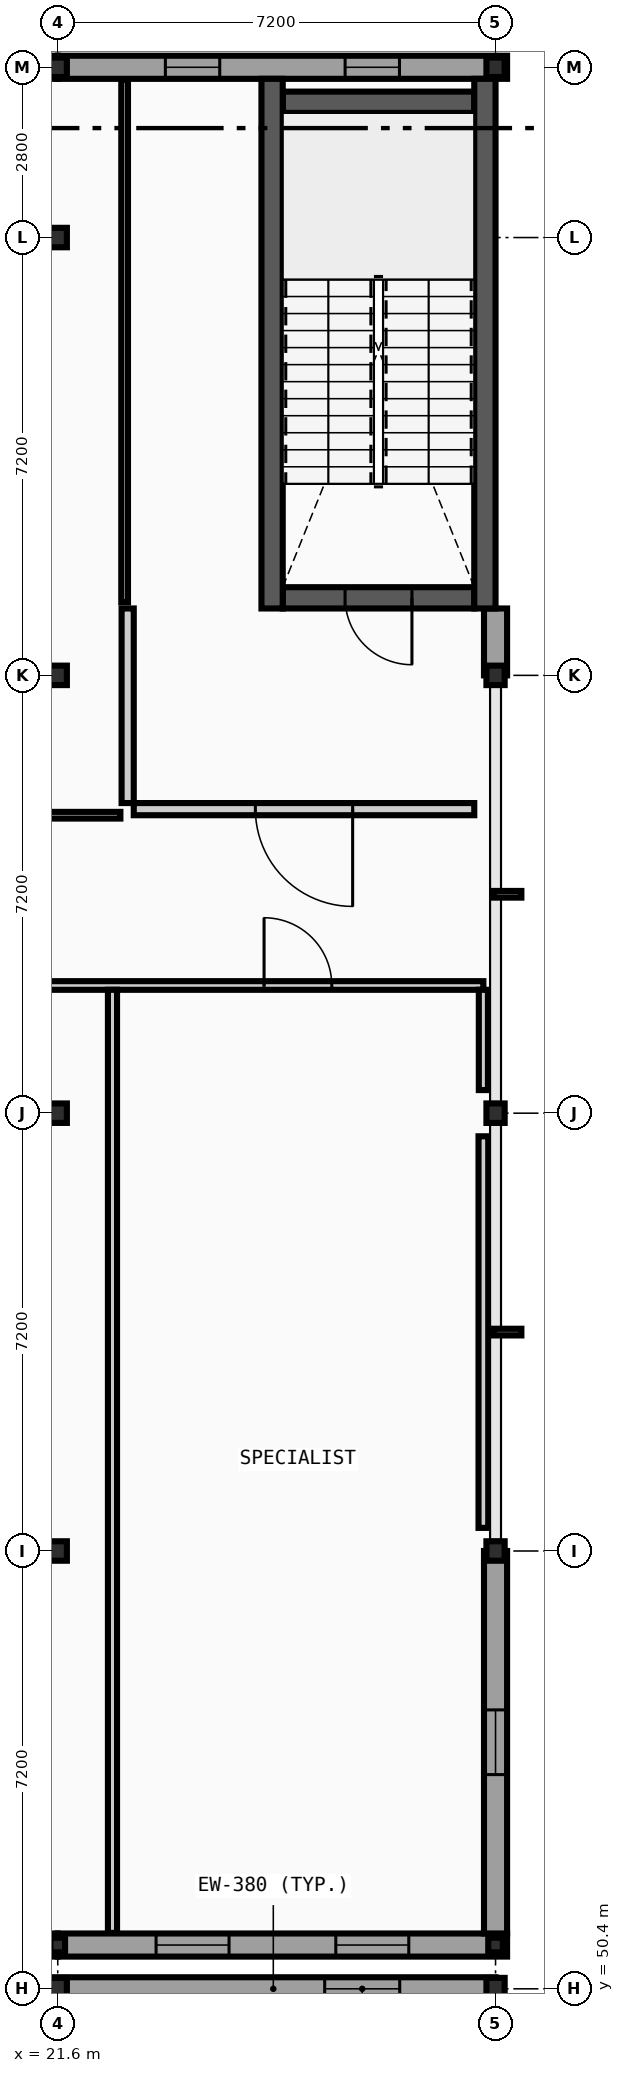
"""IFC4 building model, lengths in metres.
Left out: names, types, materials, properties, quantities, classifications, styles, units other than length and angle.
Written with IfcOpenShell. Run it as: python <this file> out.ifc"""

import sys

from ifc_helpers import new_model, si_unit, direction, frame, frame_2d, origin, origin_2d, place, context, subcontext, project, spatial, rectangle, i_section, extrude, element, fill, save


model = new_model("IFC4")
c1 = context("Model", 3, precision=1e-05, world=origin(), true_north=direction((0.0, 1.0)))
c2 = subcontext(c1, "Body", "Model", "MODEL_VIEW")
j1 = project(units=[si_unit("LENGTHUNIT", "METRE"), si_unit("PLANEANGLEUNIT", "RADIAN")], contexts=[c1])
p1 = place(None, origin())
s1 = spatial("IfcSite", under=j1, at=p1, CompositionType="ELEMENT")
p2 = place(p1, origin())
s2 = spatial("IfcBuilding", under=s1, at=p2, CompositionType="ELEMENT")
p3 = place(p2, frame((0.0, 0.0, 9.6)))
s3 = spatial("IfcBuildingStorey", under=s2, at=p3, CompositionType="ELEMENT", Elevation=9.6)
p4 = place(p3, frame((21.6, 50.4, 0.0), z_axis=(0.0, 0.0, 1.0), x_axis=(1.0, 0.0, 0.0)))
e1 = element("IfcColumn", 1, at=p4, inside=s3, PredefinedType="COLUMN", context=c2, shape_type="SweptSolid", body=[
    extrude(i_section(OverallWidth=0.3, OverallDepth=0.36, WebThickness=0.012, FlangeThickness=0.022, FilletRadius=0.027, at=origin_2d()), origin(), (0.0, 0.0, 1.0), 4.4),
])
p5 = place(p3, frame((21.6, 51.12, 0.0), z_axis=(0.0, 0.0, 1.0), x_axis=(1.0, 0.0, 0.0)))
e2 = element("IfcColumn", 2, at=p5, inside=s3, PredefinedType="COLUMN", context=c2, shape_type="SweptSolid", body=[
    extrude(i_section(OverallWidth=0.24, OverallDepth=0.24, WebThickness=0.01, FlangeThickness=0.017, FilletRadius=0.021, at=origin_2d()), origin(), (0.0, 0.0, 1.0), 4.4),
])
for number, where, z_axis, x_axis in (
    (3, (21.6, 57.6, 0.0), (0.0, 0.0, 1.0), (1.0, 0.0, 0.0)),
    (4, (21.6, 64.8, 0.0), (0.0, 0.0, 1.0), (1.0, 0.0, 0.0)),
    (5, (21.6, 72.0, 0.0), (0.0, 0.0, 1.0), (1.0, 0.0, 0.0)),
    (6, (21.6, 79.2, 0.0), (0.0, 0.0, 1.0), (1.0, 0.0, 0.0)),
    (7, (21.6, 82.0, 0.0), (0.0, 0.0, 1.0), (1.0, 0.0, 0.0)),
):
    element("IfcColumn", number, at=place(p3, frame(where, z_axis=z_axis, x_axis=x_axis)), inside=s3, PredefinedType="COLUMN", context=c2, shape_type="SweptSolid", body=[
        extrude(i_section(OverallWidth=0.3, OverallDepth=0.32, WebThickness=0.011, FlangeThickness=0.021, FilletRadius=0.027, at=origin_2d()), origin(), (0.0, 0.0, 1.0), 4.4),
    ])
p6 = place(p3, frame((28.8, 50.4, 0.0), z_axis=(0.0, 0.0, 1.0), x_axis=(1.0, 0.0, 0.0)))
e8 = element("IfcColumn", 8, at=p6, inside=s3, PredefinedType="COLUMN", context=c2, shape_type="SweptSolid", body=[
    extrude(i_section(OverallWidth=0.3, OverallDepth=0.36, WebThickness=0.012, FlangeThickness=0.022, FilletRadius=0.027, at=origin_2d()), origin(), (0.0, 0.0, 1.0), 4.4),
])
p7 = place(p3, frame((28.8, 51.12, 0.0), z_axis=(0.0, 0.0, 1.0), x_axis=(1.0, 0.0, 0.0)))
e9 = element("IfcColumn", 9, at=p7, inside=s3, PredefinedType="COLUMN", context=c2, shape_type="SweptSolid", body=[
    extrude(i_section(OverallWidth=0.24, OverallDepth=0.24, WebThickness=0.01, FlangeThickness=0.017, FilletRadius=0.021, at=origin_2d()), origin(), (0.0, 0.0, 1.0), 4.4),
])
for number, where, z_axis, x_axis in (
    (10, (28.8, 57.6, 0.0), (0.0, 0.0, 1.0), (1.0, 0.0, 0.0)),
    (11, (28.8, 64.8, 0.0), (0.0, 0.0, 1.0), (1.0, 0.0, 0.0)),
    (12, (28.8, 72.0, 0.0), (0.0, 0.0, 1.0), (1.0, 0.0, 0.0)),
    (13, (28.8, 82.0, 0.0), (0.0, 0.0, 1.0), (1.0, 0.0, 0.0)),
):
    element("IfcColumn", number, at=place(p3, frame(where, z_axis=z_axis, x_axis=x_axis)), inside=s3, PredefinedType="COLUMN", context=c2, shape_type="SweptSolid", body=[
        extrude(i_section(OverallWidth=0.3, OverallDepth=0.32, WebThickness=0.011, FlangeThickness=0.021, FilletRadius=0.027, at=origin_2d()), origin(), (0.0, 0.0, 1.0), 4.4),
    ])
p8 = place(p3, frame((28.8, 50.4, 0.0), z_axis=(0.0, 0.0, 1.0), x_axis=(-1.0, 0.0, 0.0)))
e14 = element("IfcWall", 14, at=p8, inside=s3, PredefinedType="STANDARD", context=c2, shape_type="SweptSolid", body=[
    extrude(rectangle(XDim=7.31, YDim=0.38, at=frame_2d((3.655, 0.0))), origin(), (0.0, 0.0, 1.0), 3.895),
])
p9 = place(p8, frame((1.576, 0.0, 0.95)))
e15 = element("IfcOpeningElement", 15, at=p9, cuts=e14, PredefinedType="OPENING", context=c2, shape_type="SweptSolid", body=[
    extrude(rectangle(XDim=1.234, YDim=1.296, at=frame_2d((0.617, 0.648))), frame((0.0, 0.2, 0.0), z_axis=(0.0, -1.0, 0.0), x_axis=(1.0, 0.0, 0.0)), (0.0, 0.0, 1.0), 0.4),
])
p10 = place(p3, frame((14.4, 51.12, 0.0), z_axis=(0.0, 0.0, 1.0), x_axis=(1.0, 0.0, 0.0)))
e16 = element("IfcWall", 16, at=p10, inside=s3, PredefinedType="STANDARD", context=c2, shape_type="SweptSolid", body=[
    extrude(rectangle(XDim=7.2, YDim=0.38, at=frame_2d((3.6, 0.0))), origin(), (0.0, 0.0, 1.0), 3.875),
])
p11 = place(p10, frame((1.577, 0.0, 0.95)))
e17 = element("IfcOpeningElement", 17, at=p11, cuts=e16, PredefinedType="OPENING", context=c2, shape_type="SweptSolid", body=[
    extrude(rectangle(XDim=1.166, YDim=1.26, at=frame_2d((0.583, 0.63))), frame((0.0, 0.2, 0.0), z_axis=(0.0, -1.0, 0.0), x_axis=(1.0, 0.0, 0.0)), (0.0, 0.0, 1.0), 0.4),
])
p12 = place(p3, frame((21.6, 51.12, 0.0), z_axis=(0.0, 0.0, 1.0), x_axis=(1.0, 0.0, 0.0)))
e18 = element("IfcWall", 18, at=p12, inside=s3, PredefinedType="STANDARD", context=c2, shape_type="SweptSolid", body=[
    extrude(rectangle(XDim=7.39, YDim=0.38, at=frame_2d((3.695, 0.0))), origin(), (0.0, 0.0, 1.0), 3.875),
])
p13 = place(p12, frame((1.617, 0.0, 0.95)))
e19 = element("IfcOpeningElement", 19, at=p13, cuts=e18, PredefinedType="OPENING", context=c2, shape_type="SweptSolid", body=[
    extrude(rectangle(XDim=1.2, YDim=1.26, at=frame_2d((0.6, 0.63))), frame((0.0, 0.2, 0.0), z_axis=(0.0, -1.0, 0.0), x_axis=(1.0, 0.0, 0.0)), (0.0, 0.0, 1.0), 0.4),
])
p14 = place(p12, frame((4.573, 0.0, 0.95)))
e20 = element("IfcOpeningElement", 20, at=p14, cuts=e18, PredefinedType="OPENING", context=c2, shape_type="SweptSolid", body=[
    extrude(rectangle(XDim=1.2, YDim=1.26, at=frame_2d((0.6, 0.63))), frame((0.0, 0.2, 0.0), z_axis=(0.0, -1.0, 0.0), x_axis=(1.0, 0.0, 0.0)), (0.0, 0.0, 1.0), 0.4),
])
p15 = place(p3, frame((21.6, 82.0, 0.0), z_axis=(0.0, 0.0, 1.0), x_axis=(-1.0, 0.0, 0.0)))
e21 = element("IfcWall", 21, at=p15, inside=s3, PredefinedType="STANDARD", context=c2, shape_type="SweptSolid", body=[
    extrude(rectangle(XDim=7.2, YDim=0.38, at=frame_2d((3.6, 0.0))), origin(), (0.0, 0.0, 1.0), 3.895),
])
p16 = place(p15, frame((4.61, 0.0, 0.95)))
e22 = element("IfcOpeningElement", 22, at=p16, cuts=e21, PredefinedType="OPENING", context=c2, shape_type="SweptSolid", body=[
    extrude(rectangle(XDim=0.86, YDim=1.296, at=frame_2d((0.43, 0.648))), frame((0.0, 0.2, 0.0), z_axis=(0.0, -1.0, 0.0), x_axis=(1.0, 0.0, 0.0)), (0.0, 0.0, 1.0), 0.4),
])
p17 = place(p3, frame((28.99, 82.0, 0.0), z_axis=(0.0, 0.0, 1.0), x_axis=(-1.0, 0.0, 0.0)))
e23 = element("IfcWall", 23, at=p17, inside=s3, PredefinedType="STANDARD", context=c2, shape_type="SweptSolid", body=[
    extrude(rectangle(XDim=7.39, YDim=0.38, at=frame_2d((3.695, 0.0))), origin(), (0.0, 0.0, 1.0), 3.895),
])
p18 = place(p17, frame((1.77, 0.0, 0.95)))
e24 = element("IfcOpeningElement", 24, at=p18, cuts=e23, PredefinedType="OPENING", context=c2, shape_type="SweptSolid", body=[
    extrude(rectangle(XDim=0.894, YDim=1.296, at=frame_2d((0.447, 0.648))), frame((0.0, 0.2, 0.0), z_axis=(0.0, -1.0, 0.0), x_axis=(1.0, 0.0, 0.0)), (0.0, 0.0, 1.0), 0.4),
])
p19 = place(p17, frame((4.726, 0.0, 0.95)))
e25 = element("IfcOpeningElement", 25, at=p19, cuts=e23, PredefinedType="OPENING", context=c2, shape_type="SweptSolid", body=[
    extrude(rectangle(XDim=0.894, YDim=1.296, at=frame_2d((0.447, 0.648))), frame((0.0, 0.2, 0.0), z_axis=(0.0, -1.0, 0.0), x_axis=(1.0, 0.0, 0.0)), (0.0, 0.0, 1.0), 0.4),
])
p20 = place(p3, frame((28.8, 51.31, 0.0), z_axis=(0.0, 0.0, 1.0), x_axis=(0.0, 1.0, 0.0)))
e26 = element("IfcWall", 26, at=p20, inside=s3, PredefinedType="STANDARD", context=c2, shape_type="SweptSolid", body=[
    extrude(rectangle(XDim=6.29, YDim=0.38, at=frame_2d((3.145, 0.0))), origin(), (0.0, 0.0, 1.0), 3.865),
])
p21 = place(p20, frame((2.613, 0.0, 0.95)))
e27 = element("IfcOpeningElement", 27, at=p21, cuts=e26, PredefinedType="OPENING", context=c2, shape_type="SweptSolid", body=[
    extrude(rectangle(XDim=1.064, YDim=1.296, at=frame_2d((0.532, 0.648))), frame((0.0, 0.2, 0.0), z_axis=(0.0, -1.0, 0.0), x_axis=(1.0, 0.0, 0.0)), (0.0, 0.0, 1.0), 0.4),
])
p22 = place(p3, frame((28.8, 72.0, 0.0), z_axis=(0.0, 0.0, 1.0), x_axis=(0.0, 1.0, 0.0)))
e28 = element("IfcWall", 28, at=p22, inside=s3, PredefinedType="STANDARD", context=c2, shape_type="SweptSolid", body=[
    extrude(rectangle(XDim=1.1, YDim=0.38, at=frame_2d((0.55, 0.0))), origin(), (0.0, 0.0, 1.0), 4.2),
])
p23 = place(p3, frame((25.3, 73.275, 0.0), z_axis=(0.0, 0.0, 1.0), x_axis=(1.0, 0.0, 0.0)))
e29 = element("IfcWall", 29, at=p23, inside=s3, PredefinedType="SHEAR", context=c2, shape_type="SweptSolid", body=[
    extrude(rectangle(XDim=3.15, YDim=0.35, at=frame_2d((1.575, 0.0))), origin(), (0.0, 0.0, 1.0), 4.2),
])
p24 = place(p23, frame((1.025, 0.0, 0.0)))
e30 = element("IfcOpeningElement", 30, at=p24, cuts=e29, PredefinedType="OPENING", context=c2, shape_type="SweptSolid", body=[
    extrude(rectangle(XDim=1.1, YDim=2.15, at=frame_2d((0.55, 1.075))), frame((0.0, 0.185, 0.0), z_axis=(0.0, -1.0, 0.0), x_axis=(1.0, 0.0, 0.0)), (0.0, 0.0, 1.0), 0.37),
])
p25 = place(p3, frame((25.3, 81.425, 0.0), z_axis=(0.0, 0.0, 1.0), x_axis=(1.0, 0.0, 0.0)))
e31 = element("IfcWall", 31, at=p25, inside=s3, PredefinedType="SHEAR", context=c2, shape_type="SweptSolid", body=[
    extrude(rectangle(XDim=3.15, YDim=0.35, at=frame_2d((1.575, 0.0))), origin(), (0.0, 0.0, 1.0), 4.2),
])
for number, where, z_axis, x_axis in (
    (32, (25.125, 73.1, 0.0), (0.0, 0.0, 1.0), (0.0, 1.0, 0.0)),
    (33, (28.625, 73.1, 0.0), (0.0, 0.0, 1.0), (0.0, 1.0, 0.0)),
):
    element("IfcWall", number, at=place(p3, frame(where, z_axis=z_axis, x_axis=x_axis)), inside=s3, PredefinedType="SHEAR", context=c2, shape_type="SweptSolid", body=[
        extrude(rectangle(XDim=8.71, YDim=0.35, at=frame_2d((4.355, 0.0))), origin(), (0.0, 0.0, 1.0), 4.2),
    ])
p26 = place(p3, frame((22.85, 69.8, 0.0), z_axis=(0.0, 0.0, 1.0), x_axis=(1.0, 0.0, 0.0)))
e34 = element("IfcWall", 34, at=p26, inside=s3, PredefinedType="PARTITIONING", context=c2, shape_type="SweptSolid", body=[
    extrude(rectangle(XDim=5.6, YDim=0.2, at=frame_2d((2.8, 0.0))), origin(), (0.0, 0.0, 1.0), 4.2),
])
p27 = place(p26, frame((2.0, 0.0, 0.0)))
e35 = element("IfcOpeningElement", 35, at=p27, cuts=e34, PredefinedType="OPENING", context=c2, shape_type="SweptSolid", body=[
    extrude(rectangle(XDim=1.6, YDim=2.2, at=frame_2d((0.8, 1.1))), frame((0.0, 0.11, 0.0), z_axis=(0.0, -1.0, 0.0), x_axis=(1.0, 0.0, 0.0)), (0.0, 0.0, 1.0), 0.22),
])
p28 = place(p3, frame((22.75, 69.9, 0.0), z_axis=(0.0, 0.0, 1.0), x_axis=(0.0, 1.0, 0.0)))
e36 = element("IfcWall", 36, at=p28, inside=s3, PredefinedType="PARTITIONING", context=c2, shape_type="SweptSolid", body=[
    extrude(rectangle(XDim=3.2, YDim=0.2, at=frame_2d((1.6, 0.0))), origin(), (0.0, 0.0, 1.0), 4.2),
])
p29 = place(p3, frame((14.7, 66.9, 0.0), z_axis=(0.0, 0.0, 1.0), x_axis=(1.0, 0.0, 0.0)))
e37 = element("IfcWall", 37, at=p29, inside=s3, PredefinedType="PARTITIONING", context=c2, shape_type="SweptSolid", body=[
    extrude(rectangle(XDim=13.9, YDim=0.142, at=frame_2d((6.95, 0.0))), origin(), (0.0, 0.0, 1.0), 4.2),
])
p30 = place(p29, frame((10.293, 0.0, 0.0)))
e38 = element("IfcOpeningElement", 38, at=p30, cuts=e37, PredefinedType="OPENING", context=c2, shape_type="SweptSolid", body=[
    extrude(rectangle(XDim=1.114, YDim=2.152, at=frame_2d((0.557, 1.076))), frame((0.0, 0.081, 0.0), z_axis=(0.0, -1.0, 0.0), x_axis=(1.0, 0.0, 0.0)), (0.0, 0.0, 1.0), 0.162),
])
p31 = place(p29, frame((3.33, 0.0, 0.0)))
e39 = element("IfcOpeningElement", 39, at=p31, cuts=e37, PredefinedType="OPENING", context=c2, shape_type="SweptSolid", body=[
    extrude(rectangle(XDim=1.14, YDim=2.152, at=frame_2d((0.57, 1.076))), frame((0.0, 0.081, 0.0), z_axis=(0.0, -1.0, 0.0), x_axis=(1.0, 0.0, 0.0)), (0.0, 0.0, 1.0), 0.162),
])
p32 = place(p3, frame((6.45, 69.7, 0.0), z_axis=(0.0, 0.0, 1.0), x_axis=(1.0, 0.0, 0.0)))
e40 = element("IfcWall", 40, at=p32, inside=s3, PredefinedType="PARTITIONING", context=c2, shape_type="SweptSolid", body=[
    extrude(rectangle(XDim=16.18, YDim=0.11, at=frame_2d((8.09, 0.0))), origin(), (0.0, 0.0, 1.0), 4.2),
])
p33 = place(p32, frame((2.0, 0.0, 0.0)))
e41 = element("IfcOpeningElement", 41, at=p33, cuts=e40, PredefinedType="OPENING", context=c2, shape_type="SweptSolid", body=[
    extrude(rectangle(XDim=1.0, YDim=2.1, at=frame_2d((0.5, 1.05))), frame((0.0, 0.065, 0.0), z_axis=(0.0, -1.0, 0.0), x_axis=(1.0, 0.0, 0.0)), (0.0, 0.0, 1.0), 0.13),
])
p34 = place(p32, frame((13.15, 0.0, 0.0)))
e42 = element("IfcOpeningElement", 42, at=p34, cuts=e40, PredefinedType="OPENING", context=c2, shape_type="SweptSolid", body=[
    extrude(rectangle(XDim=0.9, YDim=2.1, at=frame_2d((0.45, 1.05))), frame((0.0, 0.065, 0.0), z_axis=(0.0, -1.0, 0.0), x_axis=(1.0, 0.0, 0.0)), (0.0, 0.0, 1.0), 0.13),
])
p35 = place(p32, frame((3.9, 0.0, 0.0)))
e43 = element("IfcOpeningElement", 43, at=p35, cuts=e40, PredefinedType="OPENING", context=c2, shape_type="SweptSolid", body=[
    extrude(rectangle(XDim=1.5, YDim=2.2, at=frame_2d((0.75, 1.1))), frame((0.0, 0.065, 0.0), z_axis=(0.0, -1.0, 0.0), x_axis=(1.0, 0.0, 0.0)), (0.0, 0.0, 1.0), 0.13),
])
p36 = place(p32, frame((11.188, 0.0, 0.0)))
e44 = element("IfcOpeningElement", 44, at=p36, cuts=e40, PredefinedType="OPENING", context=c2, shape_type="SweptSolid", body=[
    extrude(rectangle(XDim=1.062, YDim=2.152, at=frame_2d((0.531, 1.076))), frame((0.0, 0.065, 0.0), z_axis=(0.0, -1.0, 0.0), x_axis=(1.0, 0.0, 0.0)), (0.0, 0.0, 1.0), 0.13),
])
p37 = place(p3, frame((22.5, 51.32, 0.0), z_axis=(0.0, 0.0, 1.0), x_axis=(0.0, 1.0, 0.0)))
e45 = element("IfcWall", 45, at=p37, inside=s3, PredefinedType="PARTITIONING", context=c2, shape_type="SweptSolid", body=[
    extrude(rectangle(XDim=15.509, YDim=0.15, at=frame_2d((7.754, 0.0))), origin(), (0.0, 0.0, 1.0), 4.2),
])
p38 = place(p3, frame((22.7, 73.2, 0.0), z_axis=(0.0, 0.0, 1.0), x_axis=(0.0, 1.0, 0.0)))
e46 = element("IfcWall", 46, at=p38, inside=s3, PredefinedType="PARTITIONING", context=c2, shape_type="SweptSolid", body=[
    extrude(rectangle(XDim=8.6, YDim=0.11, at=frame_2d((4.3, 0.0))), origin(), (0.0, 0.0, 1.0), 4.2),
])
p39 = place(p3, frame((28.6, 57.98, 0.0), z_axis=(0.0, 0.0, 1.0), x_axis=(0.0, 1.0, 0.0)))
e47 = element("IfcWall", 47, at=p39, inside=s3, PredefinedType="PARTITIONING", context=c2, shape_type="SweptSolid", body=[
    extrude(rectangle(XDim=6.44, YDim=0.16, at=frame_2d((3.22, 0.0))), origin(), (0.0, 0.0, 1.0), 3.885),
])
p40 = place(p3, frame((28.6, 65.18, 0.0), z_axis=(0.0, 0.0, 1.0), x_axis=(0.0, 1.0, 0.0)))
e48 = element("IfcWall", 48, at=p40, inside=s3, PredefinedType="PARTITIONING", context=c2, shape_type="SweptSolid", body=[
    extrude(rectangle(XDim=1.649, YDim=0.15, at=frame_2d((0.825, 0.0))), origin(), (0.0, 0.0, 1.0), 3.885),
])
p41 = place(p9, origin())
e49 = element("IfcWindow", 49, at=p41, inside=s3, PartitioningType="SINGLE_PANEL", PredefinedType="WINDOW", context=c2, shape_type="SweptSolid", body=[
    extrude(rectangle(XDim=1.234, YDim=1.296, at=frame_2d((0.617, 0.648))), frame((0.0, 0.03, 0.0), z_axis=(0.0, -1.0, 0.0), x_axis=(1.0, 0.0, 0.0)), (0.0, 0.0, 1.0), 0.06),
])
fill(e15, e49)
p42 = place(p13, origin())
e50 = element("IfcWindow", 50, at=p42, inside=s3, PartitioningType="SINGLE_PANEL", PredefinedType="WINDOW", context=c2, shape_type="SweptSolid", body=[
    extrude(rectangle(XDim=1.2, YDim=1.26, at=frame_2d((0.6, 0.63))), frame((0.0, 0.03, 0.0), z_axis=(0.0, -1.0, 0.0), x_axis=(1.0, 0.0, 0.0)), (0.0, 0.0, 1.0), 0.06),
])
fill(e19, e50)
p43 = place(p14, origin())
e51 = element("IfcWindow", 51, at=p43, inside=s3, PartitioningType="SINGLE_PANEL", PredefinedType="WINDOW", context=c2, shape_type="SweptSolid", body=[
    extrude(rectangle(XDim=1.2, YDim=1.26, at=frame_2d((0.6, 0.63))), frame((0.0, 0.03, 0.0), z_axis=(0.0, -1.0, 0.0), x_axis=(1.0, 0.0, 0.0)), (0.0, 0.0, 1.0), 0.06),
])
fill(e20, e51)
p44 = place(p18, origin())
e52 = element("IfcWindow", 52, at=p44, inside=s3, PartitioningType="SINGLE_PANEL", PredefinedType="WINDOW", context=c2, shape_type="SweptSolid", body=[
    extrude(rectangle(XDim=0.894, YDim=1.296, at=frame_2d((0.447, 0.648))), frame((0.0, 0.03, 0.0), z_axis=(0.0, -1.0, 0.0), x_axis=(1.0, 0.0, 0.0)), (0.0, 0.0, 1.0), 0.06),
])
fill(e24, e52)
p45 = place(p19, origin())
e53 = element("IfcWindow", 53, at=p45, inside=s3, PartitioningType="SINGLE_PANEL", PredefinedType="WINDOW", context=c2, shape_type="SweptSolid", body=[
    extrude(rectangle(XDim=0.894, YDim=1.296, at=frame_2d((0.447, 0.648))), frame((0.0, 0.03, 0.0), z_axis=(0.0, -1.0, 0.0), x_axis=(1.0, 0.0, 0.0)), (0.0, 0.0, 1.0), 0.06),
])
fill(e25, e53)
p46 = place(p21, origin())
e54 = element("IfcWindow", 54, at=p46, inside=s3, PartitioningType="SINGLE_PANEL", PredefinedType="WINDOW", context=c2, shape_type="SweptSolid", body=[
    extrude(rectangle(XDim=1.064, YDim=1.296, at=frame_2d((0.532, 0.648))), frame((0.0, 0.03, 0.0), z_axis=(0.0, -1.0, 0.0), x_axis=(1.0, 0.0, 0.0)), (0.0, 0.0, 1.0), 0.06),
])
fill(e27, e54)
p47 = place(p24, origin())
e55 = element("IfcDoor", 55, at=p47, inside=s3, OperationType="SINGLE_SWING_RIGHT", PredefinedType="DOOR", context=c2, shape_type="SweptSolid", body=[
    extrude(rectangle(XDim=1.1, YDim=2.15, at=frame_2d((0.55, 1.075))), frame((0.0, 0.025, 0.0), z_axis=(0.0, -1.0, 0.0), x_axis=(1.0, 0.0, 0.0)), (0.0, 0.0, 1.0), 0.05),
])
fill(e30, e55)
p48 = place(p27, origin())
e56 = element("IfcDoor", 56, at=p48, inside=s3, OperationType="DOUBLE_DOOR_SINGLE_SWING", PredefinedType="DOOR", context=c2, shape_type="SweptSolid", body=[
    extrude(rectangle(XDim=1.6, YDim=2.2, at=frame_2d((0.8, 1.1))), frame((0.0, 0.025, 0.0), z_axis=(0.0, -1.0, 0.0), x_axis=(1.0, 0.0, 0.0)), (0.0, 0.0, 1.0), 0.05),
])
fill(e35, e56)
p49 = place(p30, origin())
e57 = element("IfcDoor", 57, at=p49, inside=s3, OperationType="SINGLE_SWING_LEFT", PredefinedType="DOOR", context=c2, shape_type="SweptSolid", body=[
    extrude(rectangle(XDim=1.114, YDim=2.152, at=frame_2d((0.557, 1.076))), frame((0.0, 0.025, 0.0), z_axis=(0.0, -1.0, 0.0), x_axis=(1.0, 0.0, 0.0)), (0.0, 0.0, 1.0), 0.05),
])
fill(e38, e57)
save(model, sys.argv[1])
